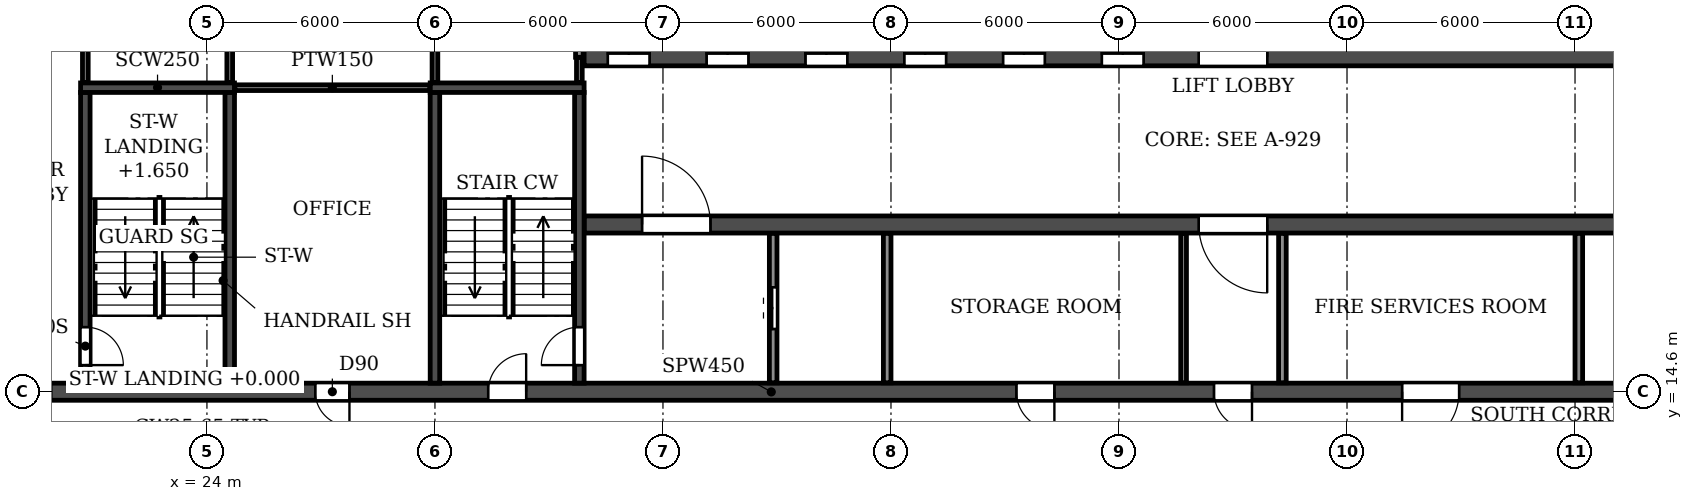
"""IFC4 building model, lengths in metres.
Left out: names, types, materials, properties, quantities, classifications, styles, units other than length and angle.
Written with IfcOpenShell. Run it as: python <this file> out.ifc"""

import sys

from ifc_helpers import new_model, si_unit, direction, frame, frame_2d, origin, place, context, subcontext, project, spatial, rectangle, extrude, element, fill, save


model = new_model("IFC4")
c1 = context("Model", 3, precision=1e-05, world=origin(), true_north=direction((0.0, 1.0)))
c2 = subcontext(c1, "Body", "Model", "MODEL_VIEW")
j1 = project(units=[si_unit("LENGTHUNIT", "METRE"), si_unit("PLANEANGLEUNIT", "RADIAN")], contexts=[c1])
p1 = place(None, origin())
s1 = spatial("IfcSite", under=j1, at=p1, CompositionType="ELEMENT")
p2 = place(p1, origin())
s2 = spatial("IfcBuilding", under=s1, at=p2, CompositionType="ELEMENT")
p3 = place(p2, frame((0.0, 0.0, 158.7)))
s3 = spatial("IfcBuildingStorey", under=s2, at=p3, CompositionType="ELEMENT", Elevation=158.7)
p4 = place(p3, frame((18.2, 14.6, 0.0), z_axis=(0.0, 0.0, 1.0), x_axis=(1.0, 0.0, 0.0)))
e1 = element("IfcWall", 1, at=p4, inside=s3, PredefinedType="SOLIDWALL", context=c2, shape_type="SweptSolid", body=[
    extrude(rectangle(XDim=65.6, YDim=0.45, at=frame_2d((32.8, 0.0))), origin(), (0.0, 0.0, 1.0), 3.07),
])
p5 = place(p4, frame((0.7, 0.0, 0.0)))
e2 = element("IfcOpeningElement", 2, at=p5, cuts=e1, PredefinedType="OPENING", context=c2, shape_type="SweptSolid", body=[
    extrude(rectangle(XDim=1.0, YDim=2.1, at=frame_2d((0.5, 1.05))), frame((0.0, 0.235, 0.0), z_axis=(0.0, -1.0, 0.0), x_axis=(1.0, 0.0, 0.0)), (0.0, 0.0, 1.0), 0.47),
])
p6 = place(p4, frame((8.65, 0.0, 0.0)))
e3 = element("IfcOpeningElement", 3, at=p6, cuts=e1, PredefinedType="OPENING", context=c2, shape_type="SweptSolid", body=[
    extrude(rectangle(XDim=0.9, YDim=2.1, at=frame_2d((0.45, 1.05))), frame((0.0, 0.235, 0.0), z_axis=(0.0, -1.0, 0.0), x_axis=(1.0, 0.0, 0.0)), (0.0, 0.0, 1.0), 0.47),
])
p7 = place(p4, frame((13.2, 0.0, 0.0)))
e4 = element("IfcOpeningElement", 4, at=p7, cuts=e1, PredefinedType="OPENING", context=c2, shape_type="SweptSolid", body=[
    extrude(rectangle(XDim=1.0, YDim=2.1, at=frame_2d((0.5, 1.05))), frame((0.0, 0.235, 0.0), z_axis=(0.0, -1.0, 0.0), x_axis=(1.0, 0.0, 0.0)), (0.0, 0.0, 1.0), 0.47),
])
p8 = place(p4, frame((27.1, 0.0, 0.0)))
e5 = element("IfcOpeningElement", 5, at=p8, cuts=e1, PredefinedType="OPENING", context=c2, shape_type="SweptSolid", body=[
    extrude(rectangle(XDim=1.0, YDim=2.1, at=frame_2d((0.5, 1.05))), frame((0.0, 0.235, 0.0), z_axis=(0.0, -1.0, 0.0), x_axis=(1.0, 0.0, 0.0)), (0.0, 0.0, 1.0), 0.47),
])
p9 = place(p4, frame((32.3, 0.0, 0.0)))
e6 = element("IfcOpeningElement", 6, at=p9, cuts=e1, PredefinedType="OPENING", context=c2, shape_type="SweptSolid", body=[
    extrude(rectangle(XDim=1.0, YDim=2.1, at=frame_2d((0.5, 1.05))), frame((0.0, 0.235, 0.0), z_axis=(0.0, -1.0, 0.0), x_axis=(1.0, 0.0, 0.0)), (0.0, 0.0, 1.0), 0.47),
])
p10 = place(p4, frame((37.25, 0.0, 0.0)))
e7 = element("IfcOpeningElement", 7, at=p10, cuts=e1, PredefinedType="OPENING", context=c2, shape_type="SweptSolid", body=[
    extrude(rectangle(XDim=1.5, YDim=2.1, at=frame_2d((0.75, 1.05))), frame((0.0, 0.235, 0.0), z_axis=(0.0, -1.0, 0.0), x_axis=(1.0, 0.0, 0.0)), (0.0, 0.0, 1.0), 0.47),
])
p11 = place(p4, frame((51.4, 0.0, 0.0)))
e8 = element("IfcOpeningElement", 8, at=p11, cuts=e1, PredefinedType="OPENING", context=c2, shape_type="SweptSolid", body=[
    extrude(rectangle(XDim=1.0, YDim=2.1, at=frame_2d((0.5, 1.05))), frame((0.0, 0.235, 0.0), z_axis=(0.0, -1.0, 0.0), x_axis=(1.0, 0.0, 0.0)), (0.0, 0.0, 1.0), 0.47),
])
p12 = place(p4, frame((56.05, 0.0, 0.0)))
e9 = element("IfcOpeningElement", 9, at=p12, cuts=e1, PredefinedType="OPENING", context=c2, shape_type="SweptSolid", body=[
    extrude(rectangle(XDim=0.9, YDim=2.1, at=frame_2d((0.45, 1.05))), frame((0.0, 0.235, 0.0), z_axis=(0.0, -1.0, 0.0), x_axis=(1.0, 0.0, 0.0)), (0.0, 0.0, 1.0), 0.47),
])
p13 = place(p4, frame((63.9, 0.0, 0.0)))
e10 = element("IfcOpeningElement", 10, at=p13, cuts=e1, PredefinedType="OPENING", context=c2, shape_type="SweptSolid", body=[
    extrude(rectangle(XDim=1.0, YDim=2.1, at=frame_2d((0.5, 1.05))), frame((0.0, 0.235, 0.0), z_axis=(0.0, -1.0, 0.0), x_axis=(1.0, 0.0, 0.0)), (0.0, 0.0, 1.0), 0.47),
])
p14 = place(p3, frame((33.925, 19.0, 0.0), z_axis=(0.0, 0.0, 1.0), x_axis=(1.0, 0.0, 0.0)))
e11 = element("IfcWall", 11, at=p14, inside=s3, PredefinedType="SOLIDWALL", context=c2, shape_type="SweptSolid", body=[
    extrude(rectangle(XDim=34.15, YDim=0.45, at=frame_2d((17.075, 0.0))), origin(), (0.0, 0.0, 1.0), 3.07),
])
p15 = place(p14, frame((16.175, 0.0, 0.0)))
e12 = element("IfcOpeningElement", 12, at=p15, cuts=e11, PredefinedType="OPENING", context=c2, shape_type="SweptSolid", body=[
    extrude(rectangle(XDim=1.8, YDim=2.1, at=frame_2d((0.9, 1.05))), frame((0.0, 0.235, 0.0), z_axis=(0.0, -1.0, 0.0), x_axis=(1.0, 0.0, 0.0)), (0.0, 0.0, 1.0), 0.47),
])
p16 = place(p14, frame((1.525, 0.0, 0.0)))
e13 = element("IfcOpeningElement", 13, at=p16, cuts=e11, PredefinedType="OPENING", context=c2, shape_type="SweptSolid", body=[
    extrude(rectangle(XDim=1.8, YDim=2.1, at=frame_2d((0.9, 1.05))), frame((0.0, 0.235, 0.0), z_axis=(0.0, -1.0, 0.0), x_axis=(1.0, 0.0, 0.0)), (0.0, 0.0, 1.0), 0.47),
])
p17 = place(p14, frame((30.825, 0.0, 0.0)))
e14 = element("IfcOpeningElement", 14, at=p17, cuts=e11, PredefinedType="OPENING", context=c2, shape_type="SweptSolid", body=[
    extrude(rectangle(XDim=1.8, YDim=2.1, at=frame_2d((0.9, 1.05))), frame((0.0, 0.235, 0.0), z_axis=(0.0, -1.0, 0.0), x_axis=(1.0, 0.0, 0.0)), (0.0, 0.0, 1.0), 0.47),
])
p18 = place(p3, frame((33.925, 23.4, 0.0), z_axis=(0.0, 0.0, 1.0), x_axis=(1.0, 0.0, 0.0)))
e15 = element("IfcWall", 15, at=p18, inside=s3, PredefinedType="SOLIDWALL", context=c2, shape_type="SweptSolid", body=[
    extrude(rectangle(XDim=34.15, YDim=0.45, at=frame_2d((17.075, 0.0))), origin(), (0.0, 0.0, 1.0), 3.07),
])
p19 = place(p18, frame((16.175, 0.0, 0.0)))
e16 = element("IfcOpeningElement", 16, at=p19, cuts=e15, PredefinedType="OPENING", context=c2, shape_type="SweptSolid", body=[
    extrude(rectangle(XDim=1.8, YDim=2.1, at=frame_2d((0.9, 1.05))), frame((0.0, 0.235, 0.0), z_axis=(0.0, -1.0, 0.0), x_axis=(1.0, 0.0, 0.0)), (0.0, 0.0, 1.0), 0.47),
])
p20 = place(p18, frame((0.625, 0.0, 0.0)))
e17 = element("IfcOpeningElement", 17, at=p20, cuts=e15, PredefinedType="OPENING", context=c2, shape_type="SweptSolid", body=[
    extrude(rectangle(XDim=1.1, YDim=2.1, at=frame_2d((0.55, 1.05))), frame((0.0, 0.235, 0.0), z_axis=(0.0, -1.0, 0.0), x_axis=(1.0, 0.0, 0.0)), (0.0, 0.0, 1.0), 0.47),
])
p21 = place(p18, frame((3.225, 0.0, 0.0)))
e18 = element("IfcOpeningElement", 18, at=p21, cuts=e15, PredefinedType="OPENING", context=c2, shape_type="SweptSolid", body=[
    extrude(rectangle(XDim=1.1, YDim=2.1, at=frame_2d((0.55, 1.05))), frame((0.0, 0.235, 0.0), z_axis=(0.0, -1.0, 0.0), x_axis=(1.0, 0.0, 0.0)), (0.0, 0.0, 1.0), 0.47),
])
p22 = place(p18, frame((5.825, 0.0, 0.0)))
e19 = element("IfcOpeningElement", 19, at=p22, cuts=e15, PredefinedType="OPENING", context=c2, shape_type="SweptSolid", body=[
    extrude(rectangle(XDim=1.1, YDim=2.1, at=frame_2d((0.55, 1.05))), frame((0.0, 0.235, 0.0), z_axis=(0.0, -1.0, 0.0), x_axis=(1.0, 0.0, 0.0)), (0.0, 0.0, 1.0), 0.47),
])
p23 = place(p18, frame((8.425, 0.0, 0.0)))
e20 = element("IfcOpeningElement", 20, at=p23, cuts=e15, PredefinedType="OPENING", context=c2, shape_type="SweptSolid", body=[
    extrude(rectangle(XDim=1.1, YDim=2.1, at=frame_2d((0.55, 1.05))), frame((0.0, 0.235, 0.0), z_axis=(0.0, -1.0, 0.0), x_axis=(1.0, 0.0, 0.0)), (0.0, 0.0, 1.0), 0.47),
])
p24 = place(p18, frame((11.025, 0.0, 0.0)))
e21 = element("IfcOpeningElement", 21, at=p24, cuts=e15, PredefinedType="OPENING", context=c2, shape_type="SweptSolid", body=[
    extrude(rectangle(XDim=1.1, YDim=2.1, at=frame_2d((0.55, 1.05))), frame((0.0, 0.235, 0.0), z_axis=(0.0, -1.0, 0.0), x_axis=(1.0, 0.0, 0.0)), (0.0, 0.0, 1.0), 0.47),
])
p25 = place(p18, frame((13.625, 0.0, 0.0)))
e22 = element("IfcOpeningElement", 22, at=p25, cuts=e15, PredefinedType="OPENING", context=c2, shape_type="SweptSolid", body=[
    extrude(rectangle(XDim=1.1, YDim=2.1, at=frame_2d((0.55, 1.05))), frame((0.0, 0.235, 0.0), z_axis=(0.0, -1.0, 0.0), x_axis=(1.0, 0.0, 0.0)), (0.0, 0.0, 1.0), 0.47),
])
p26 = place(p18, frame((27.225, 0.0, 0.0)))
e23 = element("IfcOpeningElement", 23, at=p26, cuts=e15, PredefinedType="OPENING", context=c2, shape_type="SweptSolid", body=[
    extrude(rectangle(XDim=1.1, YDim=2.1, at=frame_2d((0.55, 1.05))), frame((0.0, 0.235, 0.0), z_axis=(0.0, -1.0, 0.0), x_axis=(1.0, 0.0, 0.0)), (0.0, 0.0, 1.0), 0.47),
])
p27 = place(p3, frame((30.0, 14.825, 0.0), z_axis=(0.0, 0.0, 1.0), x_axis=(0.0, 1.0, 0.0)))
e24 = element("IfcWall", 24, at=p27, inside=s3, PredefinedType="SOLIDWALL", context=c2, shape_type="SweptSolid", body=[
    extrude(rectangle(XDim=7.65, YDim=0.25, at=frame_2d((3.825, 0.0))), origin(), (0.0, 0.0, 1.0), 3.07),
])
p28 = place(p3, frame((33.8, 14.825, 0.0), z_axis=(0.0, 0.0, 1.0), x_axis=(0.0, 1.0, 0.0)))
e25 = element("IfcWall", 25, at=p28, inside=s3, PredefinedType="SOLIDWALL", context=c2, shape_type="SweptSolid", body=[
    extrude(rectangle(XDim=7.65, YDim=0.25, at=frame_2d((3.825, 0.0))), origin(), (0.0, 0.0, 1.0), 3.07),
])
p29 = place(p28, frame((0.475, 0.0, 0.0)))
e26 = element("IfcOpeningElement", 26, at=p29, cuts=e25, PredefinedType="OPENING", context=c2, shape_type="SweptSolid", body=[
    extrude(rectangle(XDim=1.0, YDim=2.1, at=frame_2d((0.5, 1.05))), frame((0.0, 0.135, 0.0), z_axis=(0.0, -1.0, 0.0), x_axis=(1.0, 0.0, 0.0)), (0.0, 0.0, 1.0), 0.27),
])
p30 = place(p3, frame((29.875, 22.6, 0.0), z_axis=(0.0, 0.0, 1.0), x_axis=(1.0, 0.0, 0.0)))
e27 = element("IfcWall", 27, at=p30, inside=s3, PredefinedType="SOLIDWALL", context=c2, shape_type="SweptSolid", body=[
    extrude(rectangle(XDim=4.05, YDim=0.25, at=frame_2d((2.025, 0.0))), origin(), (0.0, 0.0, 1.0), 3.07),
])
p31 = place(p3, frame((20.8, 14.825, 0.0), z_axis=(0.0, 0.0, 1.0), x_axis=(0.0, 1.0, 0.0)))
e28 = element("IfcWall", 28, at=p31, inside=s3, PredefinedType="SOLIDWALL", context=c2, shape_type="SweptSolid", body=[
    extrude(rectangle(XDim=7.65, YDim=0.25, at=frame_2d((3.825, 0.0))), origin(), (0.0, 0.0, 1.0), 3.07),
])
p32 = place(p31, frame((0.475, 0.0, 0.0)))
e29 = element("IfcOpeningElement", 29, at=p32, cuts=e28, PredefinedType="OPENING", context=c2, shape_type="SweptSolid", body=[
    extrude(rectangle(XDim=1.0, YDim=2.1, at=frame_2d((0.5, 1.05))), frame((0.0, 0.135, 0.0), z_axis=(0.0, -1.0, 0.0), x_axis=(1.0, 0.0, 0.0)), (0.0, 0.0, 1.0), 0.27),
])
p33 = place(p3, frame((24.6, 14.825, 0.0), z_axis=(0.0, 0.0, 1.0), x_axis=(0.0, 1.0, 0.0)))
e30 = element("IfcWall", 30, at=p33, inside=s3, PredefinedType="SOLIDWALL", context=c2, shape_type="SweptSolid", body=[
    extrude(rectangle(XDim=7.65, YDim=0.25, at=frame_2d((3.825, 0.0))), origin(), (0.0, 0.0, 1.0), 3.07),
])
p34 = place(p3, frame((20.675, 22.6, 0.0), z_axis=(0.0, 0.0, 1.0), x_axis=(1.0, 0.0, 0.0)))
e31 = element("IfcWall", 31, at=p34, inside=s3, PredefinedType="SOLIDWALL", context=c2, shape_type="SweptSolid", body=[
    extrude(rectangle(XDim=4.05, YDim=0.25, at=frame_2d((2.025, 0.0))), origin(), (0.0, 0.0, 1.0), 3.07),
])
p35 = place(p3, frame((49.7, 14.835, 0.0), z_axis=(0.0, 0.0, 1.0), x_axis=(0.0, 1.0, 0.0)))
e32 = element("IfcWall", 32, at=p35, inside=s3, PredefinedType="PARTITIONING", context=c2, shape_type="SweptSolid", body=[
    extrude(rectangle(XDim=3.93, YDim=0.15, at=frame_2d((1.965, 0.0))), origin(), (0.0, 0.0, 1.0), 3.07),
])
p36 = place(p3, frame((24.735, 22.6, 0.0), z_axis=(0.0, 0.0, 1.0), x_axis=(1.0, 0.0, 0.0)))
e33 = element("IfcWall", 33, at=p36, inside=s3, PredefinedType="PARTITIONING", context=c2, shape_type="SweptSolid", body=[
    extrude(rectangle(XDim=5.13, YDim=0.15, at=frame_2d((2.565, 0.0))), origin(), (0.0, 0.0, 1.0), 3.07),
])
p37 = place(p3, frame((52.3, 14.835, 0.0), z_axis=(0.0, 0.0, 1.0), x_axis=(0.0, 1.0, 0.0)))
e34 = element("IfcWall", 34, at=p37, inside=s3, PredefinedType="PARTITIONING", context=c2, shape_type="SweptSolid", body=[
    extrude(rectangle(XDim=3.93, YDim=0.2, at=frame_2d((1.965, 0.0))), origin(), (0.0, 0.0, 1.0), 3.07),
])
for number, where, z_axis, x_axis in (
    (35, (20.8, 22.735, 0.0), (0.0, 0.0, 1.0), (0.0, 1.0, 0.0)),
    (36, (24.6, 22.735, 0.0), (0.0, 0.0, 1.0), (0.0, 1.0, 0.0)),
    (37, (30.0, 22.735, 0.0), (0.0, 0.0, 1.0), (0.0, 1.0, 0.0)),
):
    element("IfcWall", number, at=place(p3, frame(where, z_axis=z_axis, x_axis=x_axis)), inside=s3, PredefinedType="PARTITIONING", context=c2, shape_type="SweptSolid", body=[
        extrude(rectangle(XDim=4.83, YDim=0.15, at=frame_2d((2.415, 0.0))), origin(), (0.0, 0.0, 1.0), 3.07),
    ])
p38 = place(p3, frame((33.8, 22.735, 0.0), z_axis=(0.0, 0.0, 1.0), x_axis=(0.0, 1.0, 0.0)))
e38 = element("IfcWall", 38, at=p38, inside=s3, PredefinedType="PARTITIONING", context=c2, shape_type="SweptSolid", body=[
    extrude(rectangle(XDim=0.665, YDim=0.15, at=frame_2d((0.333, 0.0))), origin(), (0.0, 0.0, 1.0), 3.07),
])
p39 = place(p3, frame((33.8, 23.4, 0.0), z_axis=(0.0, 0.0, 1.0), x_axis=(0.0, 1.0, 0.0)))
e39 = element("IfcWall", 39, at=p39, inside=s3, PredefinedType="PARTITIONING", context=c2, shape_type="SweptSolid", body=[
    extrude(rectangle(XDim=2.7, YDim=0.2, at=frame_2d((1.35, 0.0))), origin(), (0.0, 0.0, 1.0), 3.07),
])
p40 = place(p3, frame((38.9, 14.835, 0.0), z_axis=(0.0, 0.0, 1.0), x_axis=(0.0, 1.0, 0.0)))
e40 = element("IfcWall", 40, at=p40, inside=s3, PredefinedType="PARTITIONING", context=c2, shape_type="SweptSolid", body=[
    extrude(rectangle(XDim=3.93, YDim=0.2, at=frame_2d((1.965, 0.0))), origin(), (0.0, 0.0, 1.0), 3.07),
])
p41 = place(p40, frame((1.415, 0.0, 0.0)))
e41 = element("IfcOpeningElement", 41, at=p41, cuts=e40, PredefinedType="OPENING", context=c2, shape_type="SweptSolid", body=[
    extrude(rectangle(XDim=1.1, YDim=2.1, at=frame_2d((0.55, 1.05))), frame((0.0, 0.11, 0.0), z_axis=(0.0, -1.0, 0.0), x_axis=(1.0, 0.0, 0.0)), (0.0, 0.0, 1.0), 0.22),
])
for number, where, z_axis, x_axis in (
    (42, (41.9, 14.835, 0.0), (0.0, 0.0, 1.0), (0.0, 1.0, 0.0)),
    (43, (60.1, 14.835, 0.0), (0.0, 0.0, 1.0), (0.0, 1.0, 0.0)),
):
    element("IfcWall", number, at=place(p3, frame(where, z_axis=z_axis, x_axis=x_axis)), inside=s3, PredefinedType="PARTITIONING", context=c2, shape_type="SweptSolid", body=[
        extrude(rectangle(XDim=3.93, YDim=0.2, at=frame_2d((1.965, 0.0))), origin(), (0.0, 0.0, 1.0), 3.07),
    ])
p42 = place(p6, frame((0.9, 0.0, 0.0), z_axis=(0.0, 0.0, 1.0), x_axis=(-1.0, 0.0, 0.0)))
e44 = element("IfcDoor", 44, at=p42, inside=s3, OperationType="SINGLE_SWING_LEFT", PredefinedType="DOOR", context=c2, shape_type="SweptSolid", body=[
    extrude(rectangle(XDim=0.9, YDim=2.1, at=frame_2d((0.45, 1.05))), frame((0.0, 0.025, 0.0), z_axis=(0.0, -1.0, 0.0), x_axis=(1.0, 0.0, 0.0)), (0.0, 0.0, 1.0), 0.05),
])
fill(e3, e44)
p43 = place(p7, origin())
e45 = element("IfcDoor", 45, at=p43, inside=s3, OperationType="SINGLE_SWING_RIGHT", PredefinedType="DOOR", context=c2, shape_type="SweptSolid", body=[
    extrude(rectangle(XDim=1.0, YDim=2.1, at=frame_2d((0.5, 1.05))), frame((0.0, 0.025, 0.0), z_axis=(0.0, -1.0, 0.0), x_axis=(1.0, 0.0, 0.0)), (0.0, 0.0, 1.0), 0.05),
])
fill(e4, e45)
p44 = place(p8, frame((1.0, 0.0, 0.0), z_axis=(0.0, 0.0, 1.0), x_axis=(-1.0, 0.0, 0.0)))
e46 = element("IfcDoor", 46, at=p44, inside=s3, OperationType="SINGLE_SWING_LEFT", PredefinedType="DOOR", context=c2, shape_type="SweptSolid", body=[
    extrude(rectangle(XDim=1.0, YDim=2.1, at=frame_2d((0.5, 1.05))), frame((0.0, 0.025, 0.0), z_axis=(0.0, -1.0, 0.0), x_axis=(1.0, 0.0, 0.0)), (0.0, 0.0, 1.0), 0.05),
])
fill(e5, e46)
p45 = place(p9, frame((1.0, 0.0, 0.0), z_axis=(0.0, 0.0, 1.0), x_axis=(-1.0, 0.0, 0.0)))
e47 = element("IfcDoor", 47, at=p45, inside=s3, OperationType="SINGLE_SWING_LEFT", PredefinedType="DOOR", context=c2, shape_type="SweptSolid", body=[
    extrude(rectangle(XDim=1.0, YDim=2.1, at=frame_2d((0.5, 1.05))), frame((0.0, 0.025, 0.0), z_axis=(0.0, -1.0, 0.0), x_axis=(1.0, 0.0, 0.0)), (0.0, 0.0, 1.0), 0.05),
])
fill(e6, e47)
p46 = place(p10, frame((1.5, 0.0, 0.0), z_axis=(0.0, 0.0, 1.0), x_axis=(-1.0, 0.0, 0.0)))
e48 = element("IfcDoor", 48, at=p46, inside=s3, OperationType="DOUBLE_DOOR_SINGLE_SWING", PredefinedType="DOOR", context=c2, shape_type="SweptSolid", body=[
    extrude(rectangle(XDim=1.5, YDim=2.1, at=frame_2d((0.75, 1.05))), frame((0.0, 0.025, 0.0), z_axis=(0.0, -1.0, 0.0), x_axis=(1.0, 0.0, 0.0)), (0.0, 0.0, 1.0), 0.05),
])
fill(e7, e48)
p47 = place(p29, origin())
e49 = element("IfcDoor", 49, at=p47, inside=s3, OperationType="SINGLE_SWING_LEFT", PredefinedType="DOOR", context=c2, shape_type="SweptSolid", body=[
    extrude(rectangle(XDim=1.0, YDim=2.1, at=frame_2d((0.5, 1.05))), frame((0.0, 0.025, 0.0), z_axis=(0.0, -1.0, 0.0), x_axis=(1.0, 0.0, 0.0)), (0.0, 0.0, 1.0), 0.05),
])
fill(e26, e49)
p48 = place(p41, origin())
e50 = element("IfcDoor", 50, at=p48, inside=s3, OperationType="DOUBLE_DOOR_SLIDING", PredefinedType="DOOR", context=c2, shape_type="SweptSolid", body=[
    extrude(rectangle(XDim=1.1, YDim=2.1, at=frame_2d((0.55, 1.05))), frame((0.0, 0.025, 0.0), z_axis=(0.0, -1.0, 0.0), x_axis=(1.0, 0.0, 0.0)), (0.0, 0.0, 1.0), 0.05),
])
fill(e41, e50)
p49 = place(p19, origin())
e51 = element("IfcDoor", 51, at=p49, inside=s3, OperationType="DOUBLE_DOOR_SINGLE_SWING", PredefinedType="DOOR", context=c2, shape_type="SweptSolid", body=[
    extrude(rectangle(XDim=1.8, YDim=2.1, at=frame_2d((0.9, 1.05))), frame((0.0, 0.025, 0.0), z_axis=(0.0, -1.0, 0.0), x_axis=(1.0, 0.0, 0.0)), (0.0, 0.0, 1.0), 0.05),
])
fill(e16, e51)
p50 = place(p15, frame((1.8, 0.0, 0.0), z_axis=(0.0, 0.0, 1.0), x_axis=(-1.0, 0.0, 0.0)))
e52 = element("IfcDoor", 52, at=p50, inside=s3, OperationType="DOUBLE_DOOR_SINGLE_SWING", PredefinedType="DOOR", context=c2, shape_type="SweptSolid", body=[
    extrude(rectangle(XDim=1.8, YDim=2.1, at=frame_2d((0.9, 1.05))), frame((0.0, 0.025, 0.0), z_axis=(0.0, -1.0, 0.0), x_axis=(1.0, 0.0, 0.0)), (0.0, 0.0, 1.0), 0.05),
])
fill(e12, e52)
p51 = place(p20, origin())
e53 = element("IfcDoor", 53, at=p51, inside=s3, OperationType="DOUBLE_DOOR_SLIDING", PredefinedType="DOOR", context=c2, shape_type="SweptSolid", body=[
    extrude(rectangle(XDim=1.1, YDim=2.1, at=frame_2d((0.55, 1.05))), frame((0.0, 0.025, 0.0), z_axis=(0.0, -1.0, 0.0), x_axis=(1.0, 0.0, 0.0)), (0.0, 0.0, 1.0), 0.05),
])
fill(e17, e53)
p52 = place(p16, origin())
e54 = element("IfcDoor", 54, at=p52, inside=s3, OperationType="DOUBLE_DOOR_SINGLE_SWING", PredefinedType="DOOR", context=c2, shape_type="SweptSolid", body=[
    extrude(rectangle(XDim=1.8, YDim=2.1, at=frame_2d((0.9, 1.05))), frame((0.0, 0.025, 0.0), z_axis=(0.0, -1.0, 0.0), x_axis=(1.0, 0.0, 0.0)), (0.0, 0.0, 1.0), 0.05),
])
fill(e13, e54)
p53 = place(p21, origin())
e55 = element("IfcDoor", 55, at=p53, inside=s3, OperationType="DOUBLE_DOOR_SLIDING", PredefinedType="DOOR", context=c2, shape_type="SweptSolid", body=[
    extrude(rectangle(XDim=1.1, YDim=2.1, at=frame_2d((0.55, 1.05))), frame((0.0, 0.025, 0.0), z_axis=(0.0, -1.0, 0.0), x_axis=(1.0, 0.0, 0.0)), (0.0, 0.0, 1.0), 0.05),
])
fill(e18, e55)
p54 = place(p22, origin())
e56 = element("IfcDoor", 56, at=p54, inside=s3, OperationType="DOUBLE_DOOR_SLIDING", PredefinedType="DOOR", context=c2, shape_type="SweptSolid", body=[
    extrude(rectangle(XDim=1.1, YDim=2.1, at=frame_2d((0.55, 1.05))), frame((0.0, 0.025, 0.0), z_axis=(0.0, -1.0, 0.0), x_axis=(1.0, 0.0, 0.0)), (0.0, 0.0, 1.0), 0.05),
])
fill(e19, e56)
p55 = place(p23, origin())
e57 = element("IfcDoor", 57, at=p55, inside=s3, OperationType="DOUBLE_DOOR_SLIDING", PredefinedType="DOOR", context=c2, shape_type="SweptSolid", body=[
    extrude(rectangle(XDim=1.1, YDim=2.1, at=frame_2d((0.55, 1.05))), frame((0.0, 0.025, 0.0), z_axis=(0.0, -1.0, 0.0), x_axis=(1.0, 0.0, 0.0)), (0.0, 0.0, 1.0), 0.05),
])
fill(e20, e57)
p56 = place(p24, origin())
e58 = element("IfcDoor", 58, at=p56, inside=s3, OperationType="DOUBLE_DOOR_SLIDING", PredefinedType="DOOR", context=c2, shape_type="SweptSolid", body=[
    extrude(rectangle(XDim=1.1, YDim=2.1, at=frame_2d((0.55, 1.05))), frame((0.0, 0.025, 0.0), z_axis=(0.0, -1.0, 0.0), x_axis=(1.0, 0.0, 0.0)), (0.0, 0.0, 1.0), 0.05),
])
fill(e21, e58)
p57 = place(p25, origin())
e59 = element("IfcDoor", 59, at=p57, inside=s3, OperationType="DOUBLE_DOOR_SLIDING", PredefinedType="DOOR", context=c2, shape_type="SweptSolid", body=[
    extrude(rectangle(XDim=1.1, YDim=2.1, at=frame_2d((0.55, 1.05))), frame((0.0, 0.025, 0.0), z_axis=(0.0, -1.0, 0.0), x_axis=(1.0, 0.0, 0.0)), (0.0, 0.0, 1.0), 0.05),
])
fill(e22, e59)
p58 = place(p32, frame((1.0, 0.0, 0.0), z_axis=(0.0, 0.0, 1.0), x_axis=(-1.0, 0.0, 0.0)))
e60 = element("IfcDoor", 60, at=p58, inside=s3, OperationType="SINGLE_SWING_RIGHT", PredefinedType="DOOR", context=c2, shape_type="SweptSolid", body=[
    extrude(rectangle(XDim=1.0, YDim=2.1, at=frame_2d((0.5, 1.05))), frame((0.0, 0.025, 0.0), z_axis=(0.0, -1.0, 0.0), x_axis=(1.0, 0.0, 0.0)), (0.0, 0.0, 1.0), 0.05),
])
fill(e29, e60)
save(model, sys.argv[1])
